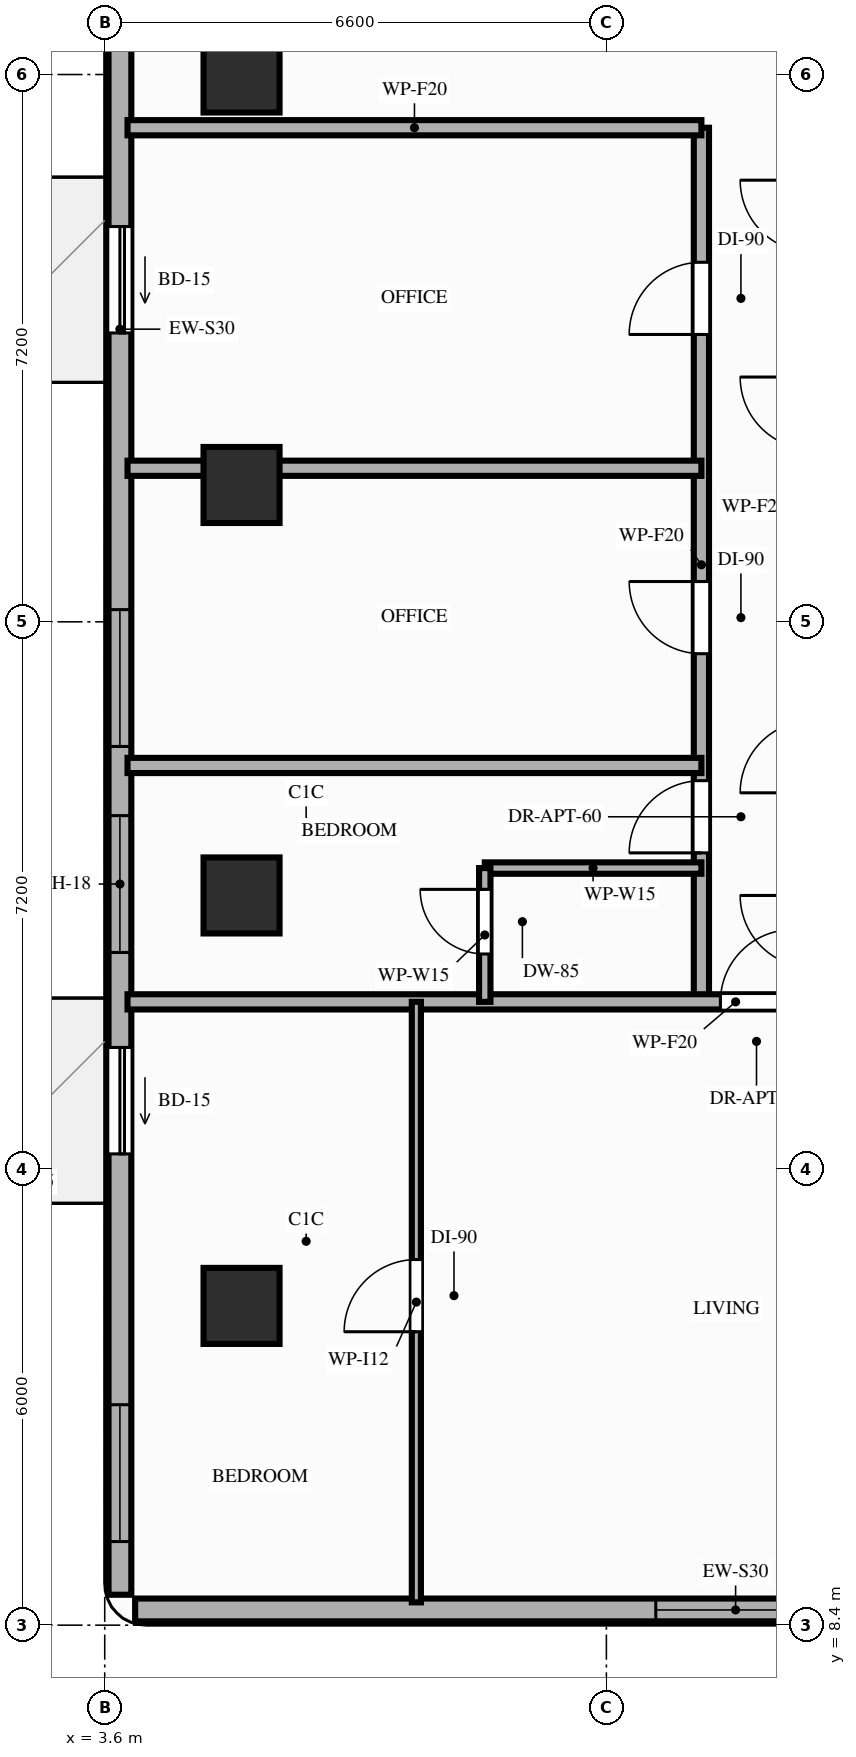
"""IFC4 building model, lengths in metres.
Left out: names, types, materials, properties, quantities, classifications, styles, units other than length and angle.
Written with IfcOpenShell. Run it as: python <this file> out.ifc"""

import sys

from ifc_helpers import new_model, si_unit, direction, frame, frame_2d, origin, origin_2d, place, context, subcontext, project, spatial, rectangle, extrude, element, fill, save


model = new_model("IFC4")
c1 = context("Model", 3, precision=1e-05, world=origin(), true_north=direction((0.0, 1.0)))
c2 = subcontext(c1, "Body", "Model", "MODEL_VIEW")
j1 = project(units=[si_unit("LENGTHUNIT", "METRE"), si_unit("PLANEANGLEUNIT", "RADIAN")], contexts=[c1])
p1 = place(None, origin())
s1 = spatial("IfcSite", under=j1, at=p1, CompositionType="ELEMENT")
p2 = place(p1, origin())
s2 = spatial("IfcBuilding", under=s1, at=p2, CompositionType="ELEMENT")
p3 = place(p2, frame((0.0, 0.0, 145.8)))
s3 = spatial("IfcBuildingStorey", under=s2, at=p3, CompositionType="ELEMENT", Elevation=145.8)
for number, where, z_axis, x_axis in (
    (1, (5.4, 12.6, 0.0), (0.0, 0.0, 1.0), (1.0, 0.0, 0.0)),
    (2, (5.4, 18.0, 0.0), (0.0, 0.0, 1.0), (1.0, 0.0, 0.0)),
    (3, (5.4, 23.4, 0.0), (0.0, 0.0, 1.0), (1.0, 0.0, 0.0)),
    (4, (5.4, 28.8, 0.0), (0.0, 0.0, 1.0), (1.0, 0.0, 0.0)),
):
    element("IfcColumn", number, at=place(p3, frame(where, z_axis=z_axis, x_axis=x_axis)), inside=s3, PredefinedType="COLUMN", context=c2, shape_type="SweptSolid", body=[
        extrude(rectangle(XDim=1.0, YDim=1.0, at=origin_2d()), origin(), (0.0, 0.0, 1.0), 3.2),
    ])
p4 = place(p3, frame((4.0, 8.6, 0.0), z_axis=(0.0, 0.0, 1.0), x_axis=(1.0, 0.0, 0.0)))
e5 = element("IfcWall", 5, at=p4, inside=s3, PredefinedType="STANDARD", context=c2, shape_type="SweptSolid", body=[
    extrude(rectangle(XDim=15.8, YDim=0.3, at=frame_2d((7.9, 0.0))), origin(), (0.0, 0.0, 1.0), 3.02),
])
p5 = place(p4, frame((6.85, 0.0, 0.85)))
e6 = element("IfcOpeningElement", 6, at=p5, cuts=e5, PredefinedType="OPENING", context=c2, shape_type="SweptSolid", body=[
    extrude(rectangle(XDim=1.8, YDim=1.75, at=frame_2d((0.9, 0.875))), frame((0.0, 0.16, 0.0), z_axis=(0.0, -1.0, 0.0), x_axis=(1.0, 0.0, 0.0)), (0.0, 0.0, 1.0), 0.32),
])
p6 = place(p3, frame((3.8, 42.1, 0.0), z_axis=(0.0, 0.0, 1.0), x_axis=(0.0, -1.0, 0.0)))
e7 = element("IfcWall", 7, at=p6, inside=s3, PredefinedType="STANDARD", context=c2, shape_type="SweptSolid", body=[
    extrude(rectangle(XDim=33.3, YDim=0.3, at=frame_2d((16.65, 0.0))), origin(), (0.0, 0.0, 1.0), 2.71),
])
p7 = place(p6, frame((26.1, 0.0, 0.0)))
e8 = element("IfcOpeningElement", 8, at=p7, cuts=e7, PredefinedType="OPENING", context=c2, shape_type="SweptSolid", body=[
    extrude(rectangle(XDim=1.4, YDim=2.1, at=frame_2d((0.7, 1.05))), frame((0.0, 0.16, 0.0), z_axis=(0.0, -1.0, 0.0), x_axis=(1.0, 0.0, 0.0)), (0.0, 0.0, 1.0), 0.32),
])
p8 = place(p6, frame((15.3, 0.0, 0.0)))
e9 = element("IfcOpeningElement", 9, at=p8, cuts=e7, PredefinedType="OPENING", context=c2, shape_type="SweptSolid", body=[
    extrude(rectangle(XDim=1.4, YDim=2.1, at=frame_2d((0.7, 1.05))), frame((0.0, 0.16, 0.0), z_axis=(0.0, -1.0, 0.0), x_axis=(1.0, 0.0, 0.0)), (0.0, 0.0, 1.0), 0.32),
])
p9 = place(p6, frame((23.05, 0.0, 0.85)))
e10 = element("IfcOpeningElement", 10, at=p9, cuts=e7, PredefinedType="OPENING", context=c2, shape_type="SweptSolid", body=[
    extrude(rectangle(XDim=1.8, YDim=1.61, at=frame_2d((0.9, 0.805))), frame((0.0, 0.16, 0.0), z_axis=(0.0, -1.0, 0.0), x_axis=(1.0, 0.0, 0.0)), (0.0, 0.0, 1.0), 0.32),
])
p10 = place(p6, frame((30.8, 0.0, 0.85)))
e11 = element("IfcOpeningElement", 11, at=p10, cuts=e7, PredefinedType="OPENING", context=c2, shape_type="SweptSolid", body=[
    extrude(rectangle(XDim=1.8, YDim=1.61, at=frame_2d((0.9, 0.805))), frame((0.0, 0.16, 0.0), z_axis=(0.0, -1.0, 0.0), x_axis=(1.0, 0.0, 0.0)), (0.0, 0.0, 1.0), 0.32),
])
p11 = place(p6, frame((20.34, 0.0, 0.85)))
e12 = element("IfcOpeningElement", 12, at=p11, cuts=e7, PredefinedType="OPENING", context=c2, shape_type="SweptSolid", body=[
    extrude(rectangle(XDim=1.8, YDim=1.61, at=frame_2d((0.9, 0.805))), frame((0.0, 0.16, 0.0), z_axis=(0.0, -1.0, 0.0), x_axis=(1.0, 0.0, 0.0)), (0.0, 0.0, 1.0), 0.32),
])
p12 = place(p6, frame((9.9, 0.0, 0.85)))
e13 = element("IfcOpeningElement", 13, at=p12, cuts=e7, PredefinedType="OPENING", context=c2, shape_type="SweptSolid", body=[
    extrude(rectangle(XDim=1.8, YDim=1.61, at=frame_2d((0.9, 0.805))), frame((0.0, 0.16, 0.0), z_axis=(0.0, -1.0, 0.0), x_axis=(1.0, 0.0, 0.0)), (0.0, 0.0, 1.0), 0.32),
])
p13 = place(p6, frame((3.8, 0.0, 0.85)))
e14 = element("IfcOpeningElement", 14, at=p13, cuts=e7, PredefinedType="OPENING", context=c2, shape_type="SweptSolid", body=[
    extrude(rectangle(XDim=1.8, YDim=1.61, at=frame_2d((0.9, 0.805))), frame((0.0, 0.16, 0.0), z_axis=(0.0, -1.0, 0.0), x_axis=(1.0, 0.0, 0.0)), (0.0, 0.0, 1.0), 0.32),
])
p14 = place(p3, frame((11.45, 16.6, 0.0), z_axis=(0.0, 0.0, 1.0), x_axis=(0.0, 1.0, 0.0)))
e15 = element("IfcWall", 15, at=p14, inside=s3, PredefinedType="PARTITIONING", context=c2, shape_type="SweptSolid", body=[
    extrude(rectangle(XDim=11.5, YDim=0.2, at=frame_2d((5.75, 0.0))), origin(), (0.0, 0.0, 1.0), 2.45),
])
p15 = place(p14, frame((1.96, 0.0, 0.0)))
e16 = element("IfcOpeningElement", 16, at=p15, cuts=e15, PredefinedType="OPENING", context=c2, shape_type="SweptSolid", body=[
    extrude(rectangle(XDim=0.95, YDim=2.15, at=frame_2d((0.475, 1.075))), frame((0.0, 0.11, 0.0), z_axis=(0.0, -1.0, 0.0), x_axis=(1.0, 0.0, 0.0)), (0.0, 0.0, 1.0), 0.22),
])
p16 = place(p14, frame((4.58, 0.0, 0.0)))
e17 = element("IfcOpeningElement", 17, at=p16, cuts=e15, PredefinedType="OPENING", context=c2, shape_type="SweptSolid", body=[
    extrude(rectangle(XDim=0.95, YDim=2.15, at=frame_2d((0.475, 1.075))), frame((0.0, 0.11, 0.0), z_axis=(0.0, -1.0, 0.0), x_axis=(1.0, 0.0, 0.0)), (0.0, 0.0, 1.0), 0.22),
])
p17 = place(p14, frame((8.78, 0.0, 0.0)))
e18 = element("IfcOpeningElement", 18, at=p17, cuts=e15, PredefinedType="OPENING", context=c2, shape_type="SweptSolid", body=[
    extrude(rectangle(XDim=0.95, YDim=2.15, at=frame_2d((0.475, 1.075))), frame((0.0, 0.11, 0.0), z_axis=(0.0, -1.0, 0.0), x_axis=(1.0, 0.0, 0.0)), (0.0, 0.0, 1.0), 0.22),
])
p18 = place(p3, frame((3.9, 16.6, 0.0), z_axis=(0.0, 0.0, 1.0), x_axis=(1.0, 0.0, 0.0)))
e19 = element("IfcWall", 19, at=p18, inside=s3, PredefinedType="PARTITIONING", context=c2, shape_type="SweptSolid", body=[
    extrude(rectangle(XDim=16.0, YDim=0.2, at=frame_2d((8.0, 0.0))), origin(), (0.0, 0.0, 1.0), 2.45),
])
p19 = place(p18, frame((7.8, 0.0, 0.0)))
e20 = element("IfcOpeningElement", 20, at=p19, cuts=e19, PredefinedType="OPENING", context=c2, shape_type="SweptSolid", body=[
    extrude(rectangle(XDim=0.95, YDim=2.15, at=frame_2d((0.475, 1.075))), frame((0.0, 0.11, 0.0), z_axis=(0.0, -1.0, 0.0), x_axis=(1.0, 0.0, 0.0)), (0.0, 0.0, 1.0), 0.22),
])
p20 = place(p3, frame((3.9, 28.1, 0.0), z_axis=(0.0, 0.0, 1.0), x_axis=(1.0, 0.0, 0.0)))
e21 = element("IfcWall", 21, at=p20, inside=s3, PredefinedType="PARTITIONING", context=c2, shape_type="SweptSolid", body=[
    extrude(rectangle(XDim=7.55, YDim=0.2, at=frame_2d((3.775, 0.0))), origin(), (0.0, 0.0, 1.0), 2.45),
])
p21 = place(p3, frame((8.6, 18.36, 0.0), z_axis=(0.0, 0.0, 1.0), x_axis=(1.0, 0.0, 0.0)))
e22 = element("IfcWall", 22, at=p21, inside=s3, PredefinedType="PARTITIONING", context=c2, shape_type="SweptSolid", body=[
    extrude(rectangle(XDim=2.85, YDim=0.15, at=frame_2d((1.425, 0.0))), origin(), (0.0, 0.0, 1.0), 2.45),
])
p22 = place(p3, frame((8.6, 16.6, 0.0), z_axis=(0.0, 0.0, 1.0), x_axis=(0.0, 1.0, 0.0)))
e23 = element("IfcWall", 23, at=p22, inside=s3, PredefinedType="PARTITIONING", context=c2, shape_type="SweptSolid", body=[
    extrude(rectangle(XDim=1.76, YDim=0.15, at=frame_2d((0.88, 0.0))), origin(), (0.0, 0.0, 1.0), 2.45),
])
p23 = place(p22, frame((0.63, 0.0, 0.0)))
e24 = element("IfcOpeningElement", 24, at=p23, cuts=e23, PredefinedType="OPENING", context=c2, shape_type="SweptSolid", body=[
    extrude(rectangle(XDim=0.85, YDim=2.1, at=frame_2d((0.425, 1.05))), frame((0.0, 0.085, 0.0), z_axis=(0.0, -1.0, 0.0), x_axis=(1.0, 0.0, 0.0)), (0.0, 0.0, 1.0), 0.17),
])
for number, where, z_axis, x_axis in (
    (25, (3.9, 19.71, 0.0), (0.0, 0.0, 1.0), (1.0, 0.0, 0.0)),
    (26, (3.9, 23.62, 0.0), (0.0, 0.0, 1.0), (1.0, 0.0, 0.0)),
):
    element("IfcWall", number, at=place(p3, frame(where, z_axis=z_axis, x_axis=x_axis)), inside=s3, PredefinedType="PARTITIONING", context=c2, shape_type="SweptSolid", body=[
        extrude(rectangle(XDim=7.55, YDim=0.2, at=frame_2d((3.775, 0.0))), origin(), (0.0, 0.0, 1.0), 2.45),
    ])
p24 = place(p3, frame((7.7, 8.7, 0.0), z_axis=(0.0, 0.0, 1.0), x_axis=(0.0, 1.0, 0.0)))
e27 = element("IfcWall", 27, at=p24, inside=s3, PredefinedType="PARTITIONING", context=c2, shape_type="SweptSolid", body=[
    extrude(rectangle(XDim=7.9, YDim=0.12, at=frame_2d((3.95, 0.0))), origin(), (0.0, 0.0, 1.0), 2.45),
])
p25 = place(p24, frame((3.56, 0.0, 0.0)))
e28 = element("IfcOpeningElement", 28, at=p25, cuts=e27, PredefinedType="OPENING", context=c2, shape_type="SweptSolid", body=[
    extrude(rectangle(XDim=0.95, YDim=2.15, at=frame_2d((0.475, 1.075))), frame((0.0, 0.07, 0.0), z_axis=(0.0, -1.0, 0.0), x_axis=(1.0, 0.0, 0.0)), (0.0, 0.0, 1.0), 0.14),
])
p26 = place(p7, origin())
e29 = element("IfcDoor", 29, at=p26, inside=s3, OperationType="SLIDING_TO_RIGHT", PredefinedType="DOOR", context=c2, shape_type="SweptSolid", body=[
    extrude(rectangle(XDim=1.4, YDim=2.1, at=frame_2d((0.7, 1.05))), frame((0.0, 0.025, 0.0), z_axis=(0.0, -1.0, 0.0), x_axis=(1.0, 0.0, 0.0)), (0.0, 0.0, 1.0), 0.05),
])
fill(e8, e29)
p27 = place(p8, origin())
e30 = element("IfcDoor", 30, at=p27, inside=s3, OperationType="SLIDING_TO_RIGHT", PredefinedType="DOOR", context=c2, shape_type="SweptSolid", body=[
    extrude(rectangle(XDim=1.4, YDim=2.1, at=frame_2d((0.7, 1.05))), frame((0.0, 0.025, 0.0), z_axis=(0.0, -1.0, 0.0), x_axis=(1.0, 0.0, 0.0)), (0.0, 0.0, 1.0), 0.05),
])
fill(e9, e30)
p28 = place(p9, origin())
e31 = element("IfcWindow", 31, at=p28, inside=s3, PartitioningType="SINGLE_PANEL", PredefinedType="WINDOW", context=c2, shape_type="SweptSolid", body=[
    extrude(rectangle(XDim=1.8, YDim=1.61, at=frame_2d((0.9, 0.805))), frame((0.0, 0.03, 0.0), z_axis=(0.0, -1.0, 0.0), x_axis=(1.0, 0.0, 0.0)), (0.0, 0.0, 1.0), 0.06),
])
fill(e10, e31)
p29 = place(p5, origin())
e32 = element("IfcWindow", 32, at=p29, inside=s3, PartitioningType="SINGLE_PANEL", PredefinedType="WINDOW", context=c2, shape_type="SweptSolid", body=[
    extrude(rectangle(XDim=1.8, YDim=1.75, at=frame_2d((0.9, 0.875))), frame((0.0, 0.03, 0.0), z_axis=(0.0, -1.0, 0.0), x_axis=(1.0, 0.0, 0.0)), (0.0, 0.0, 1.0), 0.06),
])
fill(e6, e32)
p30 = place(p10, origin())
e33 = element("IfcWindow", 33, at=p30, inside=s3, PartitioningType="SINGLE_PANEL", PredefinedType="WINDOW", context=c2, shape_type="SweptSolid", body=[
    extrude(rectangle(XDim=1.8, YDim=1.61, at=frame_2d((0.9, 0.805))), frame((0.0, 0.03, 0.0), z_axis=(0.0, -1.0, 0.0), x_axis=(1.0, 0.0, 0.0)), (0.0, 0.0, 1.0), 0.06),
])
fill(e11, e33)
p31 = place(p11, origin())
e34 = element("IfcWindow", 34, at=p31, inside=s3, PartitioningType="SINGLE_PANEL", PredefinedType="WINDOW", context=c2, shape_type="SweptSolid", body=[
    extrude(rectangle(XDim=1.8, YDim=1.61, at=frame_2d((0.9, 0.805))), frame((0.0, 0.03, 0.0), z_axis=(0.0, -1.0, 0.0), x_axis=(1.0, 0.0, 0.0)), (0.0, 0.0, 1.0), 0.06),
])
fill(e12, e34)
p32 = place(p23, origin())
e35 = element("IfcDoor", 35, at=p32, inside=s3, OperationType="SINGLE_SWING_RIGHT", PredefinedType="DOOR", context=c2, shape_type="SweptSolid", body=[
    extrude(rectangle(XDim=0.85, YDim=2.1, at=frame_2d((0.425, 1.05))), frame((0.0, 0.025, 0.0), z_axis=(0.0, -1.0, 0.0), x_axis=(1.0, 0.0, 0.0)), (0.0, 0.0, 1.0), 0.05),
])
fill(e24, e35)
p33 = place(p15, origin())
e36 = element("IfcDoor", 36, at=p33, inside=s3, OperationType="SINGLE_SWING_LEFT", PredefinedType="DOOR", context=c2, shape_type="SweptSolid", body=[
    extrude(rectangle(XDim=0.95, YDim=2.15, at=frame_2d((0.475, 1.075))), frame((0.0, 0.025, 0.0), z_axis=(0.0, -1.0, 0.0), x_axis=(1.0, 0.0, 0.0)), (0.0, 0.0, 1.0), 0.05),
])
fill(e16, e36)
p34 = place(p16, origin())
e37 = element("IfcDoor", 37, at=p34, inside=s3, OperationType="SINGLE_SWING_RIGHT", PredefinedType="DOOR", context=c2, shape_type="SweptSolid", body=[
    extrude(rectangle(XDim=0.95, YDim=2.15, at=frame_2d((0.475, 1.075))), frame((0.0, 0.025, 0.0), z_axis=(0.0, -1.0, 0.0), x_axis=(1.0, 0.0, 0.0)), (0.0, 0.0, 1.0), 0.05),
])
fill(e17, e37)
p35 = place(p17, origin())
e38 = element("IfcDoor", 38, at=p35, inside=s3, OperationType="SINGLE_SWING_LEFT", PredefinedType="DOOR", context=c2, shape_type="SweptSolid", body=[
    extrude(rectangle(XDim=0.95, YDim=2.15, at=frame_2d((0.475, 1.075))), frame((0.0, 0.025, 0.0), z_axis=(0.0, -1.0, 0.0), x_axis=(1.0, 0.0, 0.0)), (0.0, 0.0, 1.0), 0.05),
])
fill(e18, e38)
p36 = place(p19, origin())
e39 = element("IfcDoor", 39, at=p36, inside=s3, OperationType="SINGLE_SWING_RIGHT", PredefinedType="DOOR", context=c2, shape_type="SweptSolid", body=[
    extrude(rectangle(XDim=0.95, YDim=2.15, at=frame_2d((0.475, 1.075))), frame((0.0, 0.025, 0.0), z_axis=(0.0, -1.0, 0.0), x_axis=(1.0, 0.0, 0.0)), (0.0, 0.0, 1.0), 0.05),
])
fill(e20, e39)
p37 = place(p25, origin())
e40 = element("IfcDoor", 40, at=p37, inside=s3, OperationType="SINGLE_SWING_LEFT", PredefinedType="DOOR", context=c2, shape_type="SweptSolid", body=[
    extrude(rectangle(XDim=0.95, YDim=2.15, at=frame_2d((0.475, 1.075))), frame((0.0, 0.025, 0.0), z_axis=(0.0, -1.0, 0.0), x_axis=(1.0, 0.0, 0.0)), (0.0, 0.0, 1.0), 0.05),
])
fill(e28, e40)
save(model, sys.argv[1])
